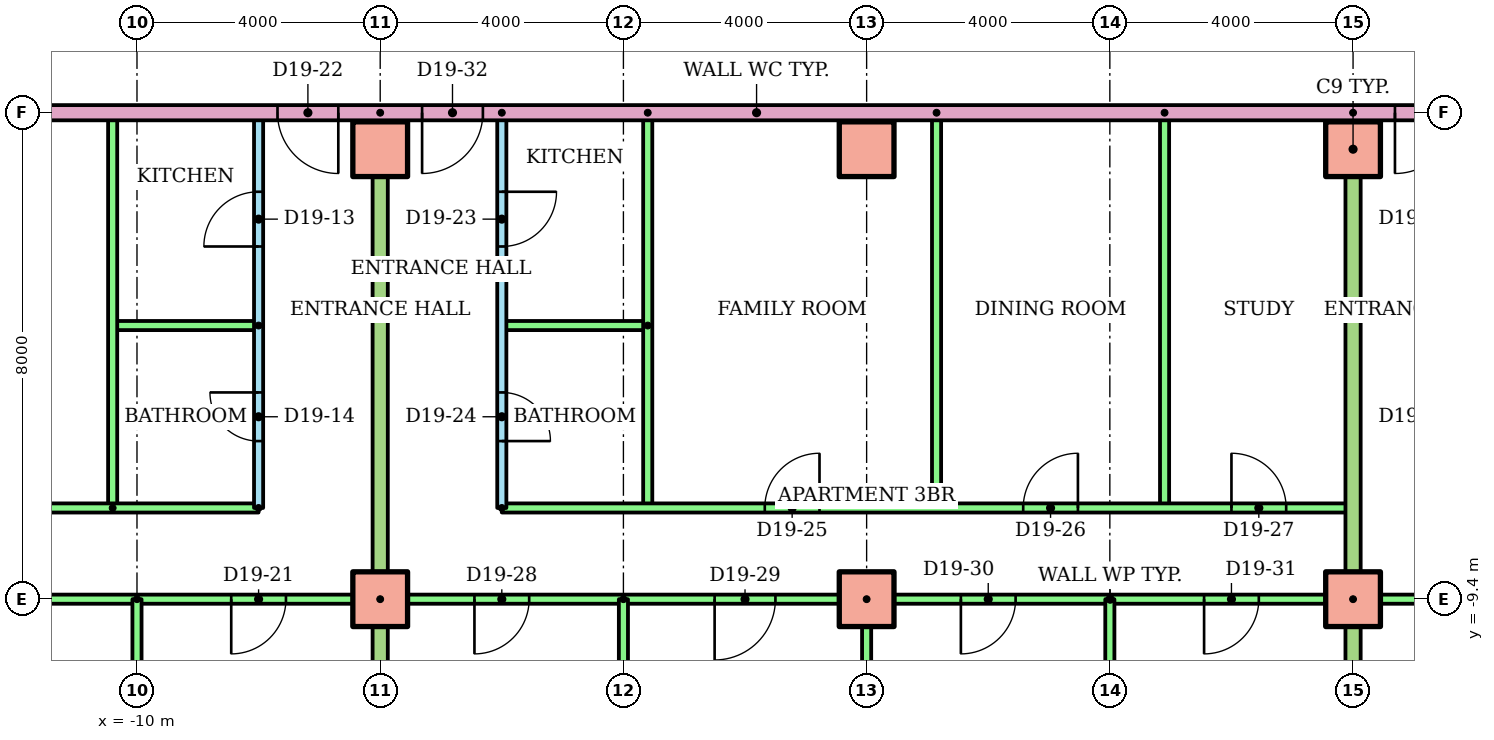
"""IFC4 building model, lengths in metres.
Left out: names, types, materials, properties, quantities, classifications, styles, units other than length and angle.
Written with IfcOpenShell. Run it as: python <this file> out.ifc"""

import sys

from ifc_helpers import new_model, si_unit, direction, frame, frame_2d, origin, origin_2d, place, context, subcontext, project, spatial, rectangle, extrude, element, fill, save


model = new_model("IFC4")
c1 = context("Model", 3, precision=1e-05, world=origin(), true_north=direction((0.0, 1.0)))
c2 = subcontext(c1, "Body", "Model", "MODEL_VIEW")
j1 = project(units=[si_unit("LENGTHUNIT", "METRE"), si_unit("PLANEANGLEUNIT", "RADIAN")], contexts=[c1])
p1 = place(None, origin())
s1 = spatial("IfcSite", under=j1, at=p1, CompositionType="ELEMENT")
p2 = place(p1, origin())
s2 = spatial("IfcBuilding", under=s1, at=p2, CompositionType="ELEMENT")
p3 = place(p2, frame((0.0, 0.0, 77.5)))
s3 = spatial("IfcBuildingStorey", under=s2, at=p3, CompositionType="ELEMENT", Elevation=77.5)
for number, where in (
    (1, (-6.0, -9.4, 0.0)),
    (2, (2.0, -9.4, 0.0)),
    (3, (10.0, -9.4, 0.0)),
    (4, (-6.0, -2.0, 0.0)),
    (5, (2.0, -2.0, 0.0)),
    (6, (10.0, -2.0, 0.0)),
):
    element("IfcColumn", number, at=place(p3, frame(where)), inside=s3, PredefinedType="COLUMN", context=c2, shape_type="SweptSolid", body=[
        extrude(rectangle(XDim=0.9, YDim=0.9, at=origin_2d()), origin(), (0.0, 0.0, 1.0), 3.2),
    ])
p4 = place(p3, frame((-8.0, -7.9, 0.0), z_axis=(0.0, 0.0, 1.0), x_axis=(0.0, 1.0, 0.0)))
e7 = element("IfcWall", 7, at=p4, inside=s3, PredefinedType="PARTITIONING", context=c2, shape_type="SweptSolid", body=[
    extrude(rectangle(XDim=6.5, YDim=0.15, at=frame_2d((3.25, 0.0))), origin(), (0.0, 0.0, 1.0), 2.4),
])
p5 = place(p4, frame((4.3, 0.0, 0.0)))
e8 = element("IfcOpeningElement", 8, at=p5, cuts=e7, PredefinedType="OPENING", context=c2, shape_type="SweptSolid", body=[
    extrude(rectangle(XDim=0.9, YDim=2.1, at=frame_2d((0.45, 1.05))), frame((0.0, 0.085, 0.0), z_axis=(0.0, -1.0, 0.0), x_axis=(1.0, 0.0, 0.0)), (0.0, 0.0, 1.0), 0.17),
])
p6 = place(p4, frame((1.1, 0.0, 0.0)))
e9 = element("IfcOpeningElement", 9, at=p6, cuts=e7, PredefinedType="OPENING", context=c2, shape_type="SweptSolid", body=[
    extrude(rectangle(XDim=0.8, YDim=2.1, at=frame_2d((0.4, 1.05))), frame((0.0, 0.085, 0.0), z_axis=(0.0, -1.0, 0.0), x_axis=(1.0, 0.0, 0.0)), (0.0, 0.0, 1.0), 0.17),
])
p7 = place(p3, frame((-8.0, -4.9, 0.0), z_axis=(0.0, 0.0, 1.0), x_axis=(-1.0, 0.0, 0.0)))
e10 = element("IfcWall", 10, at=p7, inside=s3, PredefinedType="PARTITIONING", context=c2, shape_type="SweptSolid", body=[
    extrude(rectangle(XDim=2.4, YDim=0.15, at=frame_2d((1.2, 0.0))), origin(), (0.0, 0.0, 1.0), 2.4),
])
p8 = place(p3, frame((-10.4, -7.9, 0.0), z_axis=(0.0, 0.0, 1.0), x_axis=(0.0, 1.0, 0.0)))
e11 = element("IfcWall", 11, at=p8, inside=s3, PredefinedType="PARTITIONING", context=c2, shape_type="SweptSolid", body=[
    extrude(rectangle(XDim=6.5, YDim=0.15, at=frame_2d((3.25, 0.0))), origin(), (0.0, 0.0, 1.0), 2.4),
])
p9 = place(p3, frame((-28.61, -7.9, 0.0)))
e12 = element("IfcWall", 12, at=p9, inside=s3, PredefinedType="PARTITIONING", context=c2, shape_type="SweptSolid", body=[
    extrude(rectangle(XDim=20.61, YDim=0.15, at=frame_2d((10.305, 0.0))), origin(), (0.0, 0.0, 1.0), 2.4),
])
p10 = place(p9, frame((15.51, 0.0, 0.0)))
e13 = element("IfcOpeningElement", 13, at=p10, cuts=e12, PredefinedType="OPENING", context=c2, shape_type="SweptSolid", body=[
    extrude(rectangle(XDim=0.9, YDim=2.1, at=frame_2d((0.45, 1.05))), frame((0.0, 0.085, 0.0), z_axis=(0.0, -1.0, 0.0), x_axis=(1.0, 0.0, 0.0)), (0.0, 0.0, 1.0), 0.17),
])
p11 = place(p9, frame((10.26, 0.0, 0.0)))
e14 = element("IfcOpeningElement", 14, at=p11, cuts=e12, PredefinedType="OPENING", context=c2, shape_type="SweptSolid", body=[
    extrude(rectangle(XDim=0.9, YDim=2.1, at=frame_2d((0.45, 1.05))), frame((0.0, 0.085, 0.0), z_axis=(0.0, -1.0, 0.0), x_axis=(1.0, 0.0, 0.0)), (0.0, 0.0, 1.0), 0.17),
])
p12 = place(p9, frame((3.51, 0.0, 0.0)))
e15 = element("IfcOpeningElement", 15, at=p12, cuts=e12, PredefinedType="OPENING", context=c2, shape_type="SweptSolid", body=[
    extrude(rectangle(XDim=0.9, YDim=2.1, at=frame_2d((0.45, 1.05))), frame((0.0, 0.085, 0.0), z_axis=(0.0, -1.0, 0.0), x_axis=(1.0, 0.0, 0.0)), (0.0, 0.0, 1.0), 0.17),
])
p13 = place(p3, frame((-6.0, -9.4, 0.0), z_axis=(0.0, 0.0, 1.0), x_axis=(-1.0, 0.0, 0.0)))
e16 = element("IfcWall", 16, at=p13, inside=s3, PredefinedType="PARTITIONING", context=c2, shape_type="SweptSolid", body=[
    extrude(rectangle(XDim=22.61, YDim=0.15, at=frame_2d((11.305, 0.0))), origin(), (0.0, 0.0, 1.0), 2.4),
])
p14 = place(p13, frame((19.7, 0.0, 0.0)))
e17 = element("IfcOpeningElement", 17, at=p14, cuts=e16, PredefinedType="OPENING", context=c2, shape_type="SweptSolid", body=[
    extrude(rectangle(XDim=0.9, YDim=2.1, at=frame_2d((0.45, 1.05))), frame((0.0, 0.085, 0.0), z_axis=(0.0, -1.0, 0.0), x_axis=(1.0, 0.0, 0.0)), (0.0, 0.0, 1.0), 0.17),
])
p15 = place(p13, frame((12.45, 0.0, 0.0)))
e18 = element("IfcOpeningElement", 18, at=p15, cuts=e16, PredefinedType="OPENING", context=c2, shape_type="SweptSolid", body=[
    extrude(rectangle(XDim=1.0, YDim=2.1, at=frame_2d((0.5, 1.05))), frame((0.0, 0.085, 0.0), z_axis=(0.0, -1.0, 0.0), x_axis=(1.0, 0.0, 0.0)), (0.0, 0.0, 1.0), 0.17),
])
p16 = place(p13, frame((5.55, 0.0, 0.0)))
e19 = element("IfcOpeningElement", 19, at=p16, cuts=e16, PredefinedType="OPENING", context=c2, shape_type="SweptSolid", body=[
    extrude(rectangle(XDim=0.9, YDim=2.1, at=frame_2d((0.45, 1.05))), frame((0.0, 0.085, 0.0), z_axis=(0.0, -1.0, 0.0), x_axis=(1.0, 0.0, 0.0)), (0.0, 0.0, 1.0), 0.17),
])
p17 = place(p13, frame((1.55, 0.0, 0.0)))
e20 = element("IfcOpeningElement", 20, at=p17, cuts=e16, PredefinedType="OPENING", context=c2, shape_type="SweptSolid", body=[
    extrude(rectangle(XDim=0.9, YDim=2.1, at=frame_2d((0.45, 1.05))), frame((0.0, 0.085, 0.0), z_axis=(0.0, -1.0, 0.0), x_axis=(1.0, 0.0, 0.0)), (0.0, 0.0, 1.0), 0.17),
])
p18 = place(p3, frame((-10.0, -9.4, 0.0), z_axis=(0.0, 0.0, 1.0), x_axis=(0.0, -1.0, 0.0)))
e21 = element("IfcWall", 21, at=p18, inside=s3, PredefinedType="PARTITIONING", context=c2, shape_type="SweptSolid", body=[
    extrude(rectangle(XDim=6.821, YDim=0.15, at=frame_2d((3.411, 0.0))), origin(), (0.0, 0.0, 1.0), 2.4),
])
p19 = place(p3, frame((-4.0, -1.4, 0.0), z_axis=(0.0, 0.0, 1.0), x_axis=(0.0, -1.0, 0.0)))
e22 = element("IfcWall", 22, at=p19, inside=s3, PredefinedType="PARTITIONING", context=c2, shape_type="SweptSolid", body=[
    extrude(rectangle(XDim=6.5, YDim=0.15, at=frame_2d((3.25, 0.0))), origin(), (0.0, 0.0, 1.0), 2.4),
])
p20 = place(p19, frame((1.3, 0.0, 0.0)))
e23 = element("IfcOpeningElement", 23, at=p20, cuts=e22, PredefinedType="OPENING", context=c2, shape_type="SweptSolid", body=[
    extrude(rectangle(XDim=0.9, YDim=2.1, at=frame_2d((0.45, 1.05))), frame((0.0, 0.085, 0.0), z_axis=(0.0, -1.0, 0.0), x_axis=(1.0, 0.0, 0.0)), (0.0, 0.0, 1.0), 0.17),
])
p21 = place(p19, frame((4.6, 0.0, 0.0)))
e24 = element("IfcOpeningElement", 24, at=p21, cuts=e22, PredefinedType="OPENING", context=c2, shape_type="SweptSolid", body=[
    extrude(rectangle(XDim=0.8, YDim=2.1, at=frame_2d((0.4, 1.05))), frame((0.0, 0.085, 0.0), z_axis=(0.0, -1.0, 0.0), x_axis=(1.0, 0.0, 0.0)), (0.0, 0.0, 1.0), 0.17),
])
p22 = place(p3, frame((-1.6, -4.9, 0.0), z_axis=(0.0, 0.0, 1.0), x_axis=(-1.0, 0.0, 0.0)))
e25 = element("IfcWall", 25, at=p22, inside=s3, PredefinedType="PARTITIONING", context=c2, shape_type="SweptSolid", body=[
    extrude(rectangle(XDim=2.4, YDim=0.15, at=frame_2d((1.2, 0.0))), origin(), (0.0, 0.0, 1.0), 2.4),
])
for number, where, z_axis, x_axis in (
    (26, (-1.6, -1.4, 0.0), (0.0, 0.0, 1.0), (0.0, -1.0, 0.0)),
    (27, (3.15, -1.4, 0.0), (0.0, 0.0, 1.0), (0.0, -1.0, 0.0)),
    (28, (6.9, -1.4, 0.0), (0.0, 0.0, 1.0), (0.0, -1.0, 0.0)),
):
    element("IfcWall", number, at=place(p3, frame(where, z_axis=z_axis, x_axis=x_axis)), inside=s3, PredefinedType="PARTITIONING", context=c2, shape_type="SweptSolid", body=[
        extrude(rectangle(XDim=6.5, YDim=0.15, at=frame_2d((3.25, 0.0))), origin(), (0.0, 0.0, 1.0), 2.4),
    ])
p23 = place(p3, frame((-4.0, -7.9, 0.0)))
e29 = element("IfcWall", 29, at=p23, inside=s3, PredefinedType="PARTITIONING", context=c2, shape_type="SweptSolid", body=[
    extrude(rectangle(XDim=14.0, YDim=0.15, at=frame_2d((7.0, 0.0))), origin(), (0.0, 0.0, 1.0), 2.4),
])
p24 = place(p23, frame((4.325, 0.0, 0.0)))
e30 = element("IfcOpeningElement", 30, at=p24, cuts=e29, PredefinedType="OPENING", context=c2, shape_type="SweptSolid", body=[
    extrude(rectangle(XDim=0.9, YDim=2.1, at=frame_2d((0.45, 1.05))), frame((0.0, 0.085, 0.0), z_axis=(0.0, -1.0, 0.0), x_axis=(1.0, 0.0, 0.0)), (0.0, 0.0, 1.0), 0.17),
])
p25 = place(p23, frame((8.575, 0.0, 0.0)))
e31 = element("IfcOpeningElement", 31, at=p25, cuts=e29, PredefinedType="OPENING", context=c2, shape_type="SweptSolid", body=[
    extrude(rectangle(XDim=0.9, YDim=2.1, at=frame_2d((0.45, 1.05))), frame((0.0, 0.085, 0.0), z_axis=(0.0, -1.0, 0.0), x_axis=(1.0, 0.0, 0.0)), (0.0, 0.0, 1.0), 0.17),
])
p26 = place(p23, frame((12.0, 0.0, 0.0)))
e32 = element("IfcOpeningElement", 32, at=p26, cuts=e29, PredefinedType="OPENING", context=c2, shape_type="SweptSolid", body=[
    extrude(rectangle(XDim=0.9, YDim=2.1, at=frame_2d((0.45, 1.05))), frame((0.0, 0.085, 0.0), z_axis=(0.0, -1.0, 0.0), x_axis=(1.0, 0.0, 0.0)), (0.0, 0.0, 1.0), 0.17),
])
p27 = place(p3, frame((10.0, -9.4, 0.0), z_axis=(0.0, 0.0, 1.0), x_axis=(-1.0, 0.0, 0.0)))
e33 = element("IfcWall", 33, at=p27, inside=s3, PredefinedType="PARTITIONING", context=c2, shape_type="SweptSolid", body=[
    extrude(rectangle(XDim=16.0, YDim=0.15, at=frame_2d((8.0, 0.0))), origin(), (0.0, 0.0, 1.0), 2.4),
])
p28 = place(p27, frame((13.55, 0.0, 0.0)))
e34 = element("IfcOpeningElement", 34, at=p28, cuts=e33, PredefinedType="OPENING", context=c2, shape_type="SweptSolid", body=[
    extrude(rectangle(XDim=0.9, YDim=2.1, at=frame_2d((0.45, 1.05))), frame((0.0, 0.085, 0.0), z_axis=(0.0, -1.0, 0.0), x_axis=(1.0, 0.0, 0.0)), (0.0, 0.0, 1.0), 0.17),
])
p29 = place(p27, frame((9.5, 0.0, 0.0)))
e35 = element("IfcOpeningElement", 35, at=p29, cuts=e33, PredefinedType="OPENING", context=c2, shape_type="SweptSolid", body=[
    extrude(rectangle(XDim=1.0, YDim=2.1, at=frame_2d((0.5, 1.05))), frame((0.0, 0.085, 0.0), z_axis=(0.0, -1.0, 0.0), x_axis=(1.0, 0.0, 0.0)), (0.0, 0.0, 1.0), 0.17),
])
p30 = place(p27, frame((5.55, 0.0, 0.0)))
e36 = element("IfcOpeningElement", 36, at=p30, cuts=e33, PredefinedType="OPENING", context=c2, shape_type="SweptSolid", body=[
    extrude(rectangle(XDim=0.9, YDim=2.1, at=frame_2d((0.45, 1.05))), frame((0.0, 0.085, 0.0), z_axis=(0.0, -1.0, 0.0), x_axis=(1.0, 0.0, 0.0)), (0.0, 0.0, 1.0), 0.17),
])
p31 = place(p27, frame((1.55, 0.0, 0.0)))
e37 = element("IfcOpeningElement", 37, at=p31, cuts=e33, PredefinedType="OPENING", context=c2, shape_type="SweptSolid", body=[
    extrude(rectangle(XDim=0.9, YDim=2.1, at=frame_2d((0.45, 1.05))), frame((0.0, 0.085, 0.0), z_axis=(0.0, -1.0, 0.0), x_axis=(1.0, 0.0, 0.0)), (0.0, 0.0, 1.0), 0.17),
])
p32 = place(p3, frame((-2.0, -9.4, 0.0), z_axis=(0.0, 0.0, 1.0), x_axis=(0.0, -1.0, 0.0)))
e38 = element("IfcWall", 38, at=p32, inside=s3, PredefinedType="PARTITIONING", context=c2, shape_type="SweptSolid", body=[
    extrude(rectangle(XDim=6.821, YDim=0.15, at=frame_2d((3.411, 0.0))), origin(), (0.0, 0.0, 1.0), 2.4),
])
p33 = place(p3, frame((2.0, -9.4, 0.0), z_axis=(0.0, 0.0, 1.0), x_axis=(0.0, -1.0, 0.0)))
e39 = element("IfcWall", 39, at=p33, inside=s3, PredefinedType="PARTITIONING", context=c2, shape_type="SweptSolid", body=[
    extrude(rectangle(XDim=6.81, YDim=0.15, at=frame_2d((3.405, 0.0))), origin(), (0.0, 0.0, 1.0), 2.4),
])
p34 = place(p3, frame((6.0, -9.4, 0.0), z_axis=(0.0, 0.0, 1.0), x_axis=(0.0, -1.0, 0.0)))
e40 = element("IfcWall", 40, at=p34, inside=s3, PredefinedType="PARTITIONING", context=c2, shape_type="SweptSolid", body=[
    extrude(rectangle(XDim=6.821, YDim=0.15, at=frame_2d((3.411, 0.0))), origin(), (0.0, 0.0, 1.0), 2.4),
])
p35 = place(p3, frame((-6.0, -1.4, 0.0), z_axis=(0.0, 0.0, 1.0), x_axis=(0.0, -1.0, 0.0)))
e41 = element("IfcWall", 41, at=p35, inside=s3, PredefinedType="PARTITIONING", context=c2, shape_type="SweptSolid", body=[
    extrude(rectangle(XDim=14.81, YDim=0.25, at=frame_2d((7.405, 0.0))), origin(), (0.0, 0.0, 1.0), 2.4),
])
p36 = place(p3, frame((26.0, -9.4, 0.0), z_axis=(0.0, 0.0, 1.0), x_axis=(-1.0, 0.0, 0.0)))
e42 = element("IfcWall", 42, at=p36, inside=s3, PredefinedType="PARTITIONING", context=c2, shape_type="SweptSolid", body=[
    extrude(rectangle(XDim=16.0, YDim=0.15, at=frame_2d((8.0, 0.0))), origin(), (0.0, 0.0, 1.0), 2.4),
])
p37 = place(p36, frame((13.55, 0.0, 0.0)))
e43 = element("IfcOpeningElement", 43, at=p37, cuts=e42, PredefinedType="OPENING", context=c2, shape_type="SweptSolid", body=[
    extrude(rectangle(XDim=0.9, YDim=2.1, at=frame_2d((0.45, 1.05))), frame((0.0, 0.085, 0.0), z_axis=(0.0, -1.0, 0.0), x_axis=(1.0, 0.0, 0.0)), (0.0, 0.0, 1.0), 0.17),
])
p38 = place(p36, frame((9.55, 0.0, 0.0)))
e44 = element("IfcOpeningElement", 44, at=p38, cuts=e42, PredefinedType="OPENING", context=c2, shape_type="SweptSolid", body=[
    extrude(rectangle(XDim=0.9, YDim=2.1, at=frame_2d((0.45, 1.05))), frame((0.0, 0.085, 0.0), z_axis=(0.0, -1.0, 0.0), x_axis=(1.0, 0.0, 0.0)), (0.0, 0.0, 1.0), 0.17),
])
p39 = place(p36, frame((5.55, 0.0, 0.0)))
e45 = element("IfcOpeningElement", 45, at=p39, cuts=e42, PredefinedType="OPENING", context=c2, shape_type="SweptSolid", body=[
    extrude(rectangle(XDim=0.9, YDim=2.1, at=frame_2d((0.45, 1.05))), frame((0.0, 0.085, 0.0), z_axis=(0.0, -1.0, 0.0), x_axis=(1.0, 0.0, 0.0)), (0.0, 0.0, 1.0), 0.17),
])
p40 = place(p36, frame((1.5, 0.0, 0.0)))
e46 = element("IfcOpeningElement", 46, at=p40, cuts=e42, PredefinedType="OPENING", context=c2, shape_type="SweptSolid", body=[
    extrude(rectangle(XDim=1.0, YDim=2.1, at=frame_2d((0.5, 1.05))), frame((0.0, 0.085, 0.0), z_axis=(0.0, -1.0, 0.0), x_axis=(1.0, 0.0, 0.0)), (0.0, 0.0, 1.0), 0.17),
])
p41 = place(p3, frame((10.0, -1.4, 0.0), z_axis=(0.0, 0.0, 1.0), x_axis=(0.0, -1.0, 0.0)))
e47 = element("IfcWall", 47, at=p41, inside=s3, PredefinedType="PARTITIONING", context=c2, shape_type="SweptSolid", body=[
    extrude(rectangle(XDim=14.81, YDim=0.25, at=frame_2d((7.405, 0.0))), origin(), (0.0, 0.0, 1.0), 2.4),
])
p42 = place(p3, frame((14.0, -1.4, 0.0), z_axis=(0.0, 0.0, 1.0), x_axis=(-1.0, 0.0, 0.0)))
e48 = element("IfcWall", 48, at=p42, inside=s3, PredefinedType="PARTITIONING", context=c2, shape_type="SweptSolid", body=[
    extrude(rectangle(XDim=28.0, YDim=0.25, at=frame_2d((14.0, 0.0))), origin(), (0.0, 0.0, 1.0), 2.4),
])
p43 = place(p42, frame((20.689, 0.0, 0.0)))
e49 = element("IfcOpeningElement", 49, at=p43, cuts=e48, PredefinedType="OPENING", context=c2, shape_type="SweptSolid", body=[
    extrude(rectangle(XDim=1.0, YDim=2.1, at=frame_2d((0.5, 1.05))), frame((0.0, 0.135, 0.0), z_axis=(0.0, -1.0, 0.0), x_axis=(1.0, 0.0, 0.0)), (0.0, 0.0, 1.0), 0.27),
])
p44 = place(p42, frame((18.311, 0.0, 0.0)))
e50 = element("IfcOpeningElement", 50, at=p44, cuts=e48, PredefinedType="OPENING", context=c2, shape_type="SweptSolid", body=[
    extrude(rectangle(XDim=1.0, YDim=2.1, at=frame_2d((0.5, 1.05))), frame((0.0, 0.135, 0.0), z_axis=(0.0, -1.0, 0.0), x_axis=(1.0, 0.0, 0.0)), (0.0, 0.0, 1.0), 0.27),
])
p45 = place(p42, frame((2.311, 0.0, 0.0)))
e51 = element("IfcOpeningElement", 51, at=p45, cuts=e48, PredefinedType="OPENING", context=c2, shape_type="SweptSolid", body=[
    extrude(rectangle(XDim=1.0, YDim=2.1, at=frame_2d((0.5, 1.05))), frame((0.0, 0.135, 0.0), z_axis=(0.0, -1.0, 0.0), x_axis=(1.0, 0.0, 0.0)), (0.0, 0.0, 1.0), 0.27),
])
p46 = place(p5, origin())
e52 = element("IfcDoor", 52, at=p46, inside=s3, OperationType="SINGLE_SWING_LEFT", PredefinedType="DOOR", context=c2, shape_type="SweptSolid", body=[
    extrude(rectangle(XDim=0.9, YDim=2.1, at=frame_2d((0.45, 1.05))), frame((0.0, 0.025, 0.0), z_axis=(0.0, -1.0, 0.0), x_axis=(1.0, 0.0, 0.0)), (0.0, 0.0, 1.0), 0.05),
])
fill(e8, e52)
p47 = place(p6, origin())
e53 = element("IfcDoor", 53, at=p47, inside=s3, OperationType="SINGLE_SWING_RIGHT", PredefinedType="DOOR", context=c2, shape_type="SweptSolid", body=[
    extrude(rectangle(XDim=0.8, YDim=2.1, at=frame_2d((0.4, 1.05))), frame((0.0, 0.025, 0.0), z_axis=(0.0, -1.0, 0.0), x_axis=(1.0, 0.0, 0.0)), (0.0, 0.0, 1.0), 0.05),
])
fill(e9, e53)
p48 = place(p17, origin())
e54 = element("IfcDoor", 54, at=p48, inside=s3, OperationType="SINGLE_SWING_RIGHT", PredefinedType="DOOR", context=c2, shape_type="SweptSolid", body=[
    extrude(rectangle(XDim=0.9, YDim=2.1, at=frame_2d((0.45, 1.05))), frame((0.0, 0.025, 0.0), z_axis=(0.0, -1.0, 0.0), x_axis=(1.0, 0.0, 0.0)), (0.0, 0.0, 1.0), 0.05),
])
fill(e20, e54)
p49 = place(p43, origin())
e55 = element("IfcDoor", 55, at=p49, inside=s3, OperationType="SINGLE_SWING_LEFT", PredefinedType="DOOR", context=c2, shape_type="SweptSolid", body=[
    extrude(rectangle(XDim=1.0, YDim=2.1, at=frame_2d((0.5, 1.05))), frame((0.0, 0.025, 0.0), z_axis=(0.0, -1.0, 0.0), x_axis=(1.0, 0.0, 0.0)), (0.0, 0.0, 1.0), 0.05),
])
fill(e49, e55)
p50 = place(p20, origin())
e56 = element("IfcDoor", 56, at=p50, inside=s3, OperationType="SINGLE_SWING_LEFT", PredefinedType="DOOR", context=c2, shape_type="SweptSolid", body=[
    extrude(rectangle(XDim=0.9, YDim=2.1, at=frame_2d((0.45, 1.05))), frame((0.0, 0.025, 0.0), z_axis=(0.0, -1.0, 0.0), x_axis=(1.0, 0.0, 0.0)), (0.0, 0.0, 1.0), 0.05),
])
fill(e23, e56)
p51 = place(p21, origin())
e57 = element("IfcDoor", 57, at=p51, inside=s3, OperationType="SINGLE_SWING_RIGHT", PredefinedType="DOOR", context=c2, shape_type="SweptSolid", body=[
    extrude(rectangle(XDim=0.8, YDim=2.1, at=frame_2d((0.4, 1.05))), frame((0.0, 0.025, 0.0), z_axis=(0.0, -1.0, 0.0), x_axis=(1.0, 0.0, 0.0)), (0.0, 0.0, 1.0), 0.05),
])
fill(e24, e57)
p52 = place(p24, origin())
e58 = element("IfcDoor", 58, at=p52, inside=s3, OperationType="SINGLE_SWING_RIGHT", PredefinedType="DOOR", context=c2, shape_type="SweptSolid", body=[
    extrude(rectangle(XDim=0.9, YDim=2.1, at=frame_2d((0.45, 1.05))), frame((0.0, 0.025, 0.0), z_axis=(0.0, -1.0, 0.0), x_axis=(1.0, 0.0, 0.0)), (0.0, 0.0, 1.0), 0.05),
])
fill(e30, e58)
p53 = place(p25, origin())
e59 = element("IfcDoor", 59, at=p53, inside=s3, OperationType="SINGLE_SWING_RIGHT", PredefinedType="DOOR", context=c2, shape_type="SweptSolid", body=[
    extrude(rectangle(XDim=0.9, YDim=2.1, at=frame_2d((0.45, 1.05))), frame((0.0, 0.025, 0.0), z_axis=(0.0, -1.0, 0.0), x_axis=(1.0, 0.0, 0.0)), (0.0, 0.0, 1.0), 0.05),
])
fill(e31, e59)
p54 = place(p26, origin())
e60 = element("IfcDoor", 60, at=p54, inside=s3, OperationType="SINGLE_SWING_LEFT", PredefinedType="DOOR", context=c2, shape_type="SweptSolid", body=[
    extrude(rectangle(XDim=0.9, YDim=2.1, at=frame_2d((0.45, 1.05))), frame((0.0, 0.025, 0.0), z_axis=(0.0, -1.0, 0.0), x_axis=(1.0, 0.0, 0.0)), (0.0, 0.0, 1.0), 0.05),
])
fill(e32, e60)
p55 = place(p28, origin())
e61 = element("IfcDoor", 61, at=p55, inside=s3, OperationType="SINGLE_SWING_RIGHT", PredefinedType="DOOR", context=c2, shape_type="SweptSolid", body=[
    extrude(rectangle(XDim=0.9, YDim=2.1, at=frame_2d((0.45, 1.05))), frame((0.0, 0.025, 0.0), z_axis=(0.0, -1.0, 0.0), x_axis=(1.0, 0.0, 0.0)), (0.0, 0.0, 1.0), 0.05),
])
fill(e34, e61)
p56 = place(p29, origin())
e62 = element("IfcDoor", 62, at=p56, inside=s3, OperationType="SINGLE_SWING_RIGHT", PredefinedType="DOOR", context=c2, shape_type="SweptSolid", body=[
    extrude(rectangle(XDim=1.0, YDim=2.1, at=frame_2d((0.5, 1.05))), frame((0.0, 0.025, 0.0), z_axis=(0.0, -1.0, 0.0), x_axis=(1.0, 0.0, 0.0)), (0.0, 0.0, 1.0), 0.05),
])
fill(e35, e62)
p57 = place(p30, origin())
e63 = element("IfcDoor", 63, at=p57, inside=s3, OperationType="SINGLE_SWING_RIGHT", PredefinedType="DOOR", context=c2, shape_type="SweptSolid", body=[
    extrude(rectangle(XDim=0.9, YDim=2.1, at=frame_2d((0.45, 1.05))), frame((0.0, 0.025, 0.0), z_axis=(0.0, -1.0, 0.0), x_axis=(1.0, 0.0, 0.0)), (0.0, 0.0, 1.0), 0.05),
])
fill(e36, e63)
p58 = place(p31, origin())
e64 = element("IfcDoor", 64, at=p58, inside=s3, OperationType="SINGLE_SWING_RIGHT", PredefinedType="DOOR", context=c2, shape_type="SweptSolid", body=[
    extrude(rectangle(XDim=0.9, YDim=2.1, at=frame_2d((0.45, 1.05))), frame((0.0, 0.025, 0.0), z_axis=(0.0, -1.0, 0.0), x_axis=(1.0, 0.0, 0.0)), (0.0, 0.0, 1.0), 0.05),
])
fill(e37, e64)
p59 = place(p44, origin())
e65 = element("IfcDoor", 65, at=p59, inside=s3, OperationType="SINGLE_SWING_RIGHT", PredefinedType="DOOR", context=c2, shape_type="SweptSolid", body=[
    extrude(rectangle(XDim=1.0, YDim=2.1, at=frame_2d((0.5, 1.05))), frame((0.0, 0.025, 0.0), z_axis=(0.0, -1.0, 0.0), x_axis=(1.0, 0.0, 0.0)), (0.0, 0.0, 1.0), 0.05),
])
fill(e50, e65)
p60 = place(p45, origin())
e66 = element("IfcDoor", 66, at=p60, inside=s3, OperationType="SINGLE_SWING_RIGHT", PredefinedType="DOOR", context=c2, shape_type="SweptSolid", body=[
    extrude(rectangle(XDim=1.0, YDim=2.1, at=frame_2d((0.5, 1.05))), frame((0.0, 0.025, 0.0), z_axis=(0.0, -1.0, 0.0), x_axis=(1.0, 0.0, 0.0)), (0.0, 0.0, 1.0), 0.05),
])
fill(e51, e66)
save(model, sys.argv[1])
